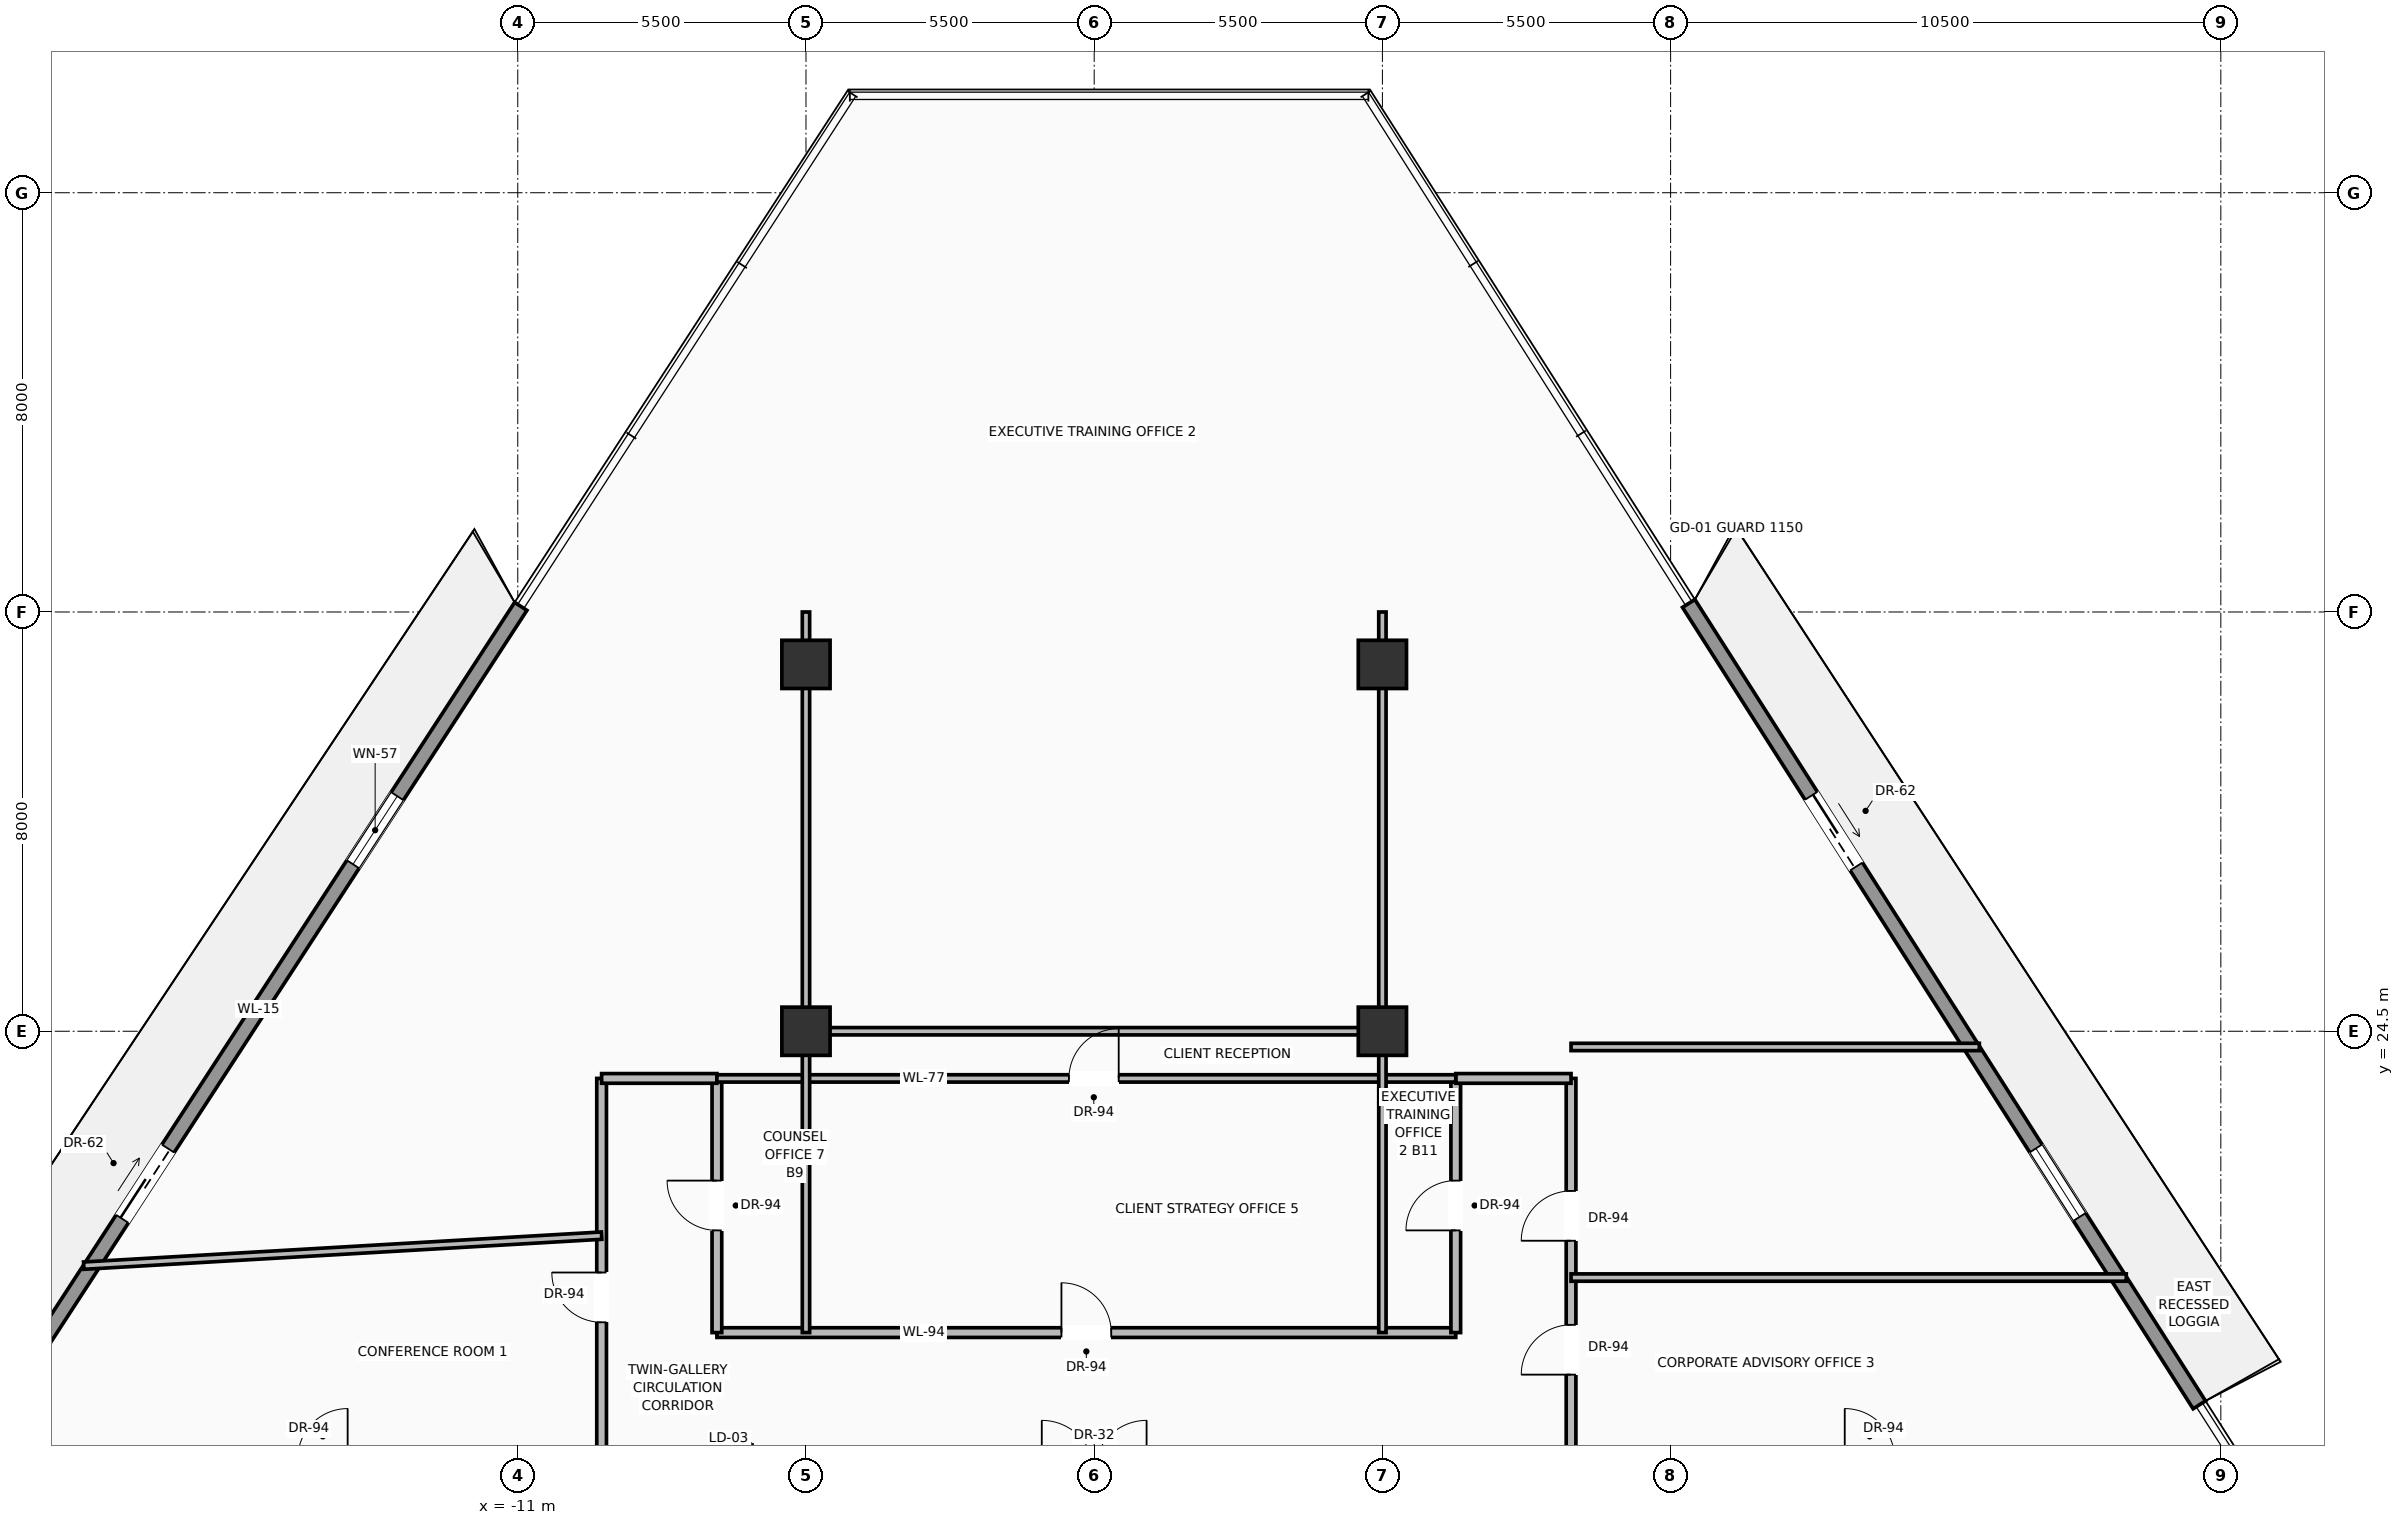
"""IFC4 building model, lengths in metres.
Left out: names, types, materials, properties, quantities, classifications, styles, units other than length and angle.
Written with IfcOpenShell. Run it as: python <this file> out.ifc"""

import sys

from ifc_helpers import new_model, si_unit, direction, frame, frame_2d, origin, origin_2d, place, context, subcontext, project, spatial, rectangle, extrude, source, transform, mapped, element, fill, save


model = new_model("IFC4")
c1 = context("Model", 3, precision=1e-05, world=origin(), true_north=direction((0.0, 1.0)))
c2 = subcontext(c1, "Body", "Model", "MODEL_VIEW")
j1 = project(units=[si_unit("LENGTHUNIT", "METRE"), si_unit("PLANEANGLEUNIT", "RADIAN")], contexts=[c1])
p1 = place(None, origin())
s1 = spatial("IfcSite", under=j1, at=p1, CompositionType="ELEMENT")
p2 = place(p1, origin())
s2 = spatial("IfcBuilding", under=s1, at=p2, CompositionType="ELEMENT")
p3 = place(p2, frame((0.0, 0.0, 140.4)))
s3 = spatial("IfcBuildingStorey", under=s2, at=p3, CompositionType="ELEMENT", Elevation=140.4)
m1 = source(origin(), c2, "Body", "SweptSolid", [
    extrude(rectangle(XDim=0.92, YDim=0.92, at=origin_2d()), origin(), (0.0, 0.0, 1.0), 3.7),
])
for number, where, z_axis, x_axis in (
    (1, (-5.5, 24.5, 0.0), (0.0, 0.0, 1.0), (1.0, 0.0, 0.0)),
    (2, (5.5, 24.5, 0.0), (0.0, 0.0, 1.0), (1.0, 0.0, 0.0)),
    (3, (-5.5, 31.5, 0.0), (0.0, 0.0, 1.0), (1.0, 0.0, 0.0)),
    (4, (5.5, 31.5, 0.0), (0.0, 0.0, 1.0), (1.0, 0.0, 0.0)),
):
    element("IfcColumn", number, at=place(p3, frame(where, z_axis=z_axis, x_axis=x_axis)), inside=s3, PredefinedType="COLUMN", context=c2, shape_type="MappedRepresentation", body=[
        mapped(m1, transform((0.0, 0.0, 0.0), scale=1.0)),
    ])
p4 = place(p3, frame((-20.948, 17.229, 0.0), z_axis=(0.0, 0.0, 1.0), x_axis=(0.545376053717, 0.838191481723, 0.0)))
e5 = element("IfcWall", 5, at=p4, inside=s3, PredefinedType="SOLIDWALL", context=c2, shape_type="SweptSolid", body=[
    extrude(rectangle(XDim=18.346, YDim=0.28, at=frame_2d((9.173, 0.0))), origin(), (0.0, 0.0, 1.0), 3.05),
])
p5 = place(p4, frame((4.403, 0.0, 0.0)))
e6 = element("IfcOpeningElement", 6, at=p5, cuts=e5, PredefinedType="OPENING", context=c2, shape_type="SweptSolid", body=[
    extrude(rectangle(XDim=1.6, YDim=2.35, at=frame_2d((0.8, 1.175))), frame((0.0, 0.15, 0.0), z_axis=(0.0, -1.0, 0.0), x_axis=(1.0, 0.0, 0.0)), (0.0, 0.0, 1.0), 0.3),
])
p6 = place(p4, frame((12.475, 0.0, 0.9)))
e7 = element("IfcOpeningElement", 7, at=p6, cuts=e5, PredefinedType="OPENING", context=c2, shape_type="SweptSolid", body=[
    extrude(rectangle(XDim=1.55, YDim=1.85, at=frame_2d((0.775, 0.925))), frame((0.0, 0.15, 0.0), z_axis=(0.0, -1.0, 0.0), x_axis=(1.0, 0.0, 0.0)), (0.0, 0.0, 1.0), 0.3),
])
p7 = place(p3, frame((11.345, 32.663, 0.0), z_axis=(0.0, 0.0, 1.0), x_axis=(0.537390272984, -0.843333679217, 0.0)))
e8 = element("IfcWall", 8, at=p7, inside=s3, PredefinedType="SOLIDWALL", context=c2, shape_type="SweptSolid", body=[
    extrude(rectangle(XDim=18.133, YDim=0.28, at=frame_2d((9.066, 0.0))), origin(), (0.0, 0.0, 1.0), 3.05),
])
p8 = place(p7, frame((4.352, 0.0, 0.0)))
e9 = element("IfcOpeningElement", 9, at=p8, cuts=e8, PredefinedType="OPENING", context=c2, shape_type="SweptSolid", body=[
    extrude(rectangle(XDim=1.6, YDim=2.35, at=frame_2d((0.8, 1.175))), frame((0.0, 0.15, 0.0), z_axis=(0.0, -1.0, 0.0), x_axis=(1.0, 0.0, 0.0)), (0.0, 0.0, 1.0), 0.3),
])
p9 = place(p7, frame((12.33, 0.0, 0.9)))
e10 = element("IfcOpeningElement", 10, at=p9, cuts=e8, PredefinedType="OPENING", context=c2, shape_type="SweptSolid", body=[
    extrude(rectangle(XDim=1.55, YDim=1.85, at=frame_2d((0.775, 0.925))), frame((0.0, 0.15, 0.0), z_axis=(0.0, -1.0, 0.0), x_axis=(1.0, 0.0, 0.0)), (0.0, 0.0, 1.0), 0.3),
])
p10 = place(p3, frame((-7.2, 18.75, 0.0), z_axis=(0.0, 0.0, 1.0), x_axis=(1.0, 0.0, 0.0)))
e11 = element("IfcWall", 11, at=p10, inside=s3, PredefinedType="PARTITIONING", context=c2, shape_type="SweptSolid", body=[
    extrude(rectangle(XDim=14.1, YDim=0.185, at=frame_2d((7.05, 0.0))), origin(), (0.0, 0.0, 1.0), 2.846),
])
p11 = place(p10, frame((6.575, 0.0, 0.0)))
e12 = element("IfcOpeningElement", 12, at=p11, cuts=e11, PredefinedType="OPENING", context=c2, shape_type="SweptSolid", body=[
    extrude(rectangle(XDim=0.95, YDim=2.2, at=frame_2d((0.475, 1.1))), frame((0.0, 0.103, 0.0), z_axis=(0.0, -1.0, 0.0), x_axis=(1.0, 0.0, 0.0)), (0.0, 0.0, 1.0), 0.205),
])
p12 = place(p3, frame((-7.2, 18.75, 0.0), z_axis=(0.0, 0.0, 1.0), x_axis=(0.0, 1.0, 0.0)))
e13 = element("IfcWall", 13, at=p12, inside=s3, PredefinedType="PARTITIONING", context=c2, shape_type="SweptSolid", body=[
    extrude(rectangle(XDim=4.85, YDim=0.185, at=frame_2d((2.425, 0.0))), origin(), (0.0, 0.0, 1.0), 3.462),
])
p13 = place(p12, frame((1.95, 0.0, 0.0)))
e14 = element("IfcOpeningElement", 14, at=p13, cuts=e13, PredefinedType="OPENING", context=c2, shape_type="SweptSolid", body=[
    extrude(rectangle(XDim=0.95, YDim=2.2, at=frame_2d((0.475, 1.1))), frame((0.0, 0.103, 0.0), z_axis=(0.0, -1.0, 0.0), x_axis=(1.0, 0.0, 0.0)), (0.0, 0.0, 1.0), 0.205),
])
p14 = place(p3, frame((6.9, 18.75, 0.0), z_axis=(0.0, 0.0, 1.0), x_axis=(0.0, 1.0, 0.0)))
e15 = element("IfcWall", 15, at=p14, inside=s3, PredefinedType="PARTITIONING", context=c2, shape_type="SweptSolid", body=[
    extrude(rectangle(XDim=4.85, YDim=0.185, at=frame_2d((2.425, 0.0))), origin(), (0.0, 0.0, 1.0), 3.462),
])
p15 = place(p14, frame((1.95, 0.0, 0.0)))
e16 = element("IfcOpeningElement", 16, at=p15, cuts=e15, PredefinedType="OPENING", context=c2, shape_type="SweptSolid", body=[
    extrude(rectangle(XDim=0.95, YDim=2.2, at=frame_2d((0.475, 1.1))), frame((0.0, 0.103, 0.0), z_axis=(0.0, -1.0, 0.0), x_axis=(1.0, 0.0, 0.0)), (0.0, 0.0, 1.0), 0.205),
])
p16 = place(p3, frame((-9.4, 16.4, 0.0), z_axis=(0.0, 0.0, 1.0), x_axis=(0.0, 1.0, 0.0)))
e17 = element("IfcWall", 17, at=p16, inside=s3, PredefinedType="PARTITIONING", context=c2, shape_type="SweptSolid", body=[
    extrude(rectangle(XDim=7.2, YDim=0.185, at=frame_2d((3.6, 0.0))), origin(), (0.0, 0.0, 1.0), 3.462),
])
p17 = place(p16, frame((2.546, 0.0, 0.0)))
e18 = element("IfcOpeningElement", 18, at=p17, cuts=e17, PredefinedType="OPENING", context=c2, shape_type="SweptSolid", body=[
    extrude(rectangle(XDim=0.95, YDim=2.2, at=frame_2d((0.475, 1.1))), frame((0.0, 0.103, 0.0), z_axis=(0.0, -1.0, 0.0), x_axis=(1.0, 0.0, 0.0)), (0.0, 0.0, 1.0), 0.205),
])
p18 = place(p3, frame((9.1, 16.4, 0.0), z_axis=(0.0, 0.0, 1.0), x_axis=(0.0, 1.0, 0.0)))
e19 = element("IfcWall", 19, at=p18, inside=s3, PredefinedType="PARTITIONING", context=c2, shape_type="SweptSolid", body=[
    extrude(rectangle(XDim=7.2, YDim=0.185, at=frame_2d((3.6, 0.0))), origin(), (0.0, 0.0, 1.0), 3.462),
])
p19 = place(p18, frame((4.103, 0.0, 0.0)))
e20 = element("IfcOpeningElement", 20, at=p19, cuts=e19, PredefinedType="OPENING", context=c2, shape_type="SweptSolid", body=[
    extrude(rectangle(XDim=0.95, YDim=2.2, at=frame_2d((0.475, 1.1))), frame((0.0, 0.103, 0.0), z_axis=(0.0, -1.0, 0.0), x_axis=(1.0, 0.0, 0.0)), (0.0, 0.0, 1.0), 0.205),
])
p20 = place(p18, frame((1.548, 0.0, 0.0)))
e21 = element("IfcOpeningElement", 21, at=p20, cuts=e19, PredefinedType="OPENING", context=c2, shape_type="SweptSolid", body=[
    extrude(rectangle(XDim=0.95, YDim=2.2, at=frame_2d((0.475, 1.1))), frame((0.0, 0.103, 0.0), z_axis=(0.0, -1.0, 0.0), x_axis=(1.0, 0.0, 0.0)), (0.0, 0.0, 1.0), 0.205),
])
p21 = place(p3, frame((-9.4, 23.6, 0.0), z_axis=(0.0, 0.0, 1.0), x_axis=(1.0, 0.0, 0.0)))
e22 = element("IfcWall", 22, at=p21, inside=s3, PredefinedType="PARTITIONING", context=c2, shape_type="SweptSolid", body=[
    extrude(rectangle(XDim=2.2, YDim=0.185, at=frame_2d((1.1, 0.0))), origin(), (0.0, 0.0, 1.0), 3.462),
])
p22 = place(p3, frame((6.9, 23.6, 0.0), z_axis=(0.0, 0.0, 1.0), x_axis=(1.0, 0.0, 0.0)))
e23 = element("IfcWall", 23, at=p22, inside=s3, PredefinedType="PARTITIONING", context=c2, shape_type="SweptSolid", body=[
    extrude(rectangle(XDim=2.2, YDim=0.185, at=frame_2d((1.1, 0.0))), origin(), (0.0, 0.0, 1.0), 3.462),
])
p23 = place(p3, frame((-7.2, 23.6, 0.0), z_axis=(0.0, 0.0, 1.0), x_axis=(1.0, 0.0, 0.0)))
e24 = element("IfcWall", 24, at=p23, inside=s3, PredefinedType="PARTITIONING", context=c2, shape_type="SweptSolid", body=[
    extrude(rectangle(XDim=14.1, YDim=0.14, at=frame_2d((7.05, 0.0))), origin(), (0.0, 0.0, 1.0), 3.462),
])
p24 = place(p23, frame((6.718, 0.0, 0.0)))
e25 = element("IfcOpeningElement", 25, at=p24, cuts=e24, PredefinedType="OPENING", context=c2, shape_type="SweptSolid", body=[
    extrude(rectangle(XDim=0.95, YDim=2.2, at=frame_2d((0.475, 1.1))), frame((0.0, 0.08, 0.0), z_axis=(0.0, -1.0, 0.0), x_axis=(1.0, 0.0, 0.0)), (0.0, 0.0, 1.0), 0.16),
])
for number, where, z_axis, x_axis in (
    (26, (-5.5, 18.75, 0.0), (0.0, 0.0, 1.0), (0.0, 1.0, 0.0)),
    (27, (5.5, 18.75, 0.0), (0.0, 0.0, 1.0), (0.0, 1.0, 0.0)),
):
    element("IfcWall", number, at=place(p3, frame(where, z_axis=z_axis, x_axis=x_axis)), inside=s3, PredefinedType="PARTITIONING", context=c2, shape_type="SweptSolid", body=[
        extrude(rectangle(XDim=13.75, YDim=0.14, at=frame_2d((6.875, 0.0))), origin(), (0.0, 0.0, 1.0), 2.846),
    ])
p25 = place(p3, frame((-5.5, 24.5, 0.0), z_axis=(0.0, 0.0, 1.0), x_axis=(1.0, 0.0, 0.0)))
e28 = element("IfcWall", 28, at=p25, inside=s3, PredefinedType="PARTITIONING", context=c2, shape_type="SweptSolid", body=[
    extrude(rectangle(XDim=11.0, YDim=0.14, at=frame_2d((5.5, 0.0))), origin(), (0.0, 0.0, 1.0), 2.846),
])
p26 = place(p3, frame((-19.283, 20.027, 0.0), z_axis=(0.0, 0.0, 1.0), x_axis=(0.998323429122, 0.057882042691, 0.0)))
e29 = element("IfcWall", 29, at=p26, inside=s3, PredefinedType="PARTITIONING", context=c2, shape_type="SweptSolid", body=[
    extrude(rectangle(XDim=9.899, YDim=0.14, at=frame_2d((4.95, 0.0))), origin(), (0.0, 0.0, 1.0), 3.462),
])
p27 = place(p3, frame((9.1, 19.8, 0.0), z_axis=(0.0, 0.0, 1.0), x_axis=(1.0, 0.0, 0.0)))
e30 = element("IfcWall", 30, at=p27, inside=s3, PredefinedType="PARTITIONING", context=c2, shape_type="SweptSolid", body=[
    extrude(rectangle(XDim=10.596, YDim=0.14, at=frame_2d((5.298, 0.0))), origin(), (0.0, 0.0, 1.0), 3.462),
])
p28 = place(p3, frame((9.1, 24.2, 0.0), z_axis=(0.0, 0.0, 1.0), x_axis=(1.0, 0.0, 0.0)))
e31 = element("IfcWall", 31, at=p28, inside=s3, PredefinedType="PARTITIONING", context=c2, shape_type="SweptSolid", body=[
    extrude(rectangle(XDim=7.792, YDim=0.14, at=frame_2d((3.896, 0.0))), origin(), (0.0, 0.0, 1.0), 3.462),
])
m2 = source(origin(), c2, "Body", "SweptSolid", [
    extrude(rectangle(XDim=1.6, YDim=2.35, at=frame_2d((0.8, 1.175))), frame((0.0, 0.025, 0.0), z_axis=(0.0, -1.0, 0.0), x_axis=(1.0, 0.0, 0.0)), (0.0, 0.0, 1.0), 0.05),
])
p29 = place(p5, origin())
e32 = element("IfcDoor", 32, at=p29, inside=s3, OperationType="SLIDING_TO_LEFT", PredefinedType="DOOR", context=c2, shape_type="MappedRepresentation", body=[
    mapped(m2, transform((0.0, 0.0, 0.0), scale=1.0)),
])
fill(e6, e32)
m3 = source(origin(), c2, "Body", "SweptSolid", [
    extrude(rectangle(XDim=1.55, YDim=1.85, at=frame_2d((0.775, 0.925))), frame((0.0, 0.03, 0.0), z_axis=(0.0, -1.0, 0.0), x_axis=(1.0, 0.0, 0.0)), (0.0, 0.0, 1.0), 0.06),
])
p30 = place(p6, origin())
e33 = element("IfcWindow", 33, at=p30, inside=s3, PartitioningType="SINGLE_PANEL", PredefinedType="WINDOW", context=c2, shape_type="MappedRepresentation", body=[
    mapped(m3, transform((0.0, 0.0, 0.0), scale=1.0)),
])
fill(e7, e33)
p31 = place(p8, origin())
e34 = element("IfcDoor", 34, at=p31, inside=s3, OperationType="SLIDING_TO_RIGHT", PredefinedType="DOOR", context=c2, shape_type="MappedRepresentation", body=[
    mapped(m2, transform((0.0, 0.0, 0.0), scale=1.0)),
])
fill(e9, e34)
p32 = place(p9, origin())
e35 = element("IfcWindow", 35, at=p32, inside=s3, PartitioningType="SINGLE_PANEL", PredefinedType="WINDOW", context=c2, shape_type="MappedRepresentation", body=[
    mapped(m3, transform((0.0, 0.0, 0.0), scale=1.0)),
])
fill(e10, e35)
m4 = source(origin(), c2, "Body", "SweptSolid", [
    extrude(rectangle(XDim=0.95, YDim=2.2, at=frame_2d((0.475, 1.1))), frame((0.0, 0.025, 0.0), z_axis=(0.0, -1.0, 0.0), x_axis=(1.0, 0.0, 0.0)), (0.0, 0.0, 1.0), 0.05),
])
p33 = place(p11, origin())
e36 = element("IfcDoor", 36, at=p33, inside=s3, OperationType="SINGLE_SWING_LEFT", PredefinedType="DOOR", context=c2, shape_type="MappedRepresentation", body=[
    mapped(m4, transform((0.0, 0.0, 0.0), scale=1.0)),
])
fill(e12, e36)
p34 = place(p17, origin())
e37 = element("IfcDoor", 37, at=p34, inside=s3, OperationType="SINGLE_SWING_RIGHT", PredefinedType="DOOR", context=c2, shape_type="MappedRepresentation", body=[
    mapped(m4, transform((0.0, 0.0, 0.0), scale=1.0)),
])
fill(e18, e37)
p35 = place(p19, origin())
e38 = element("IfcDoor", 38, at=p35, inside=s3, OperationType="SINGLE_SWING_LEFT", PredefinedType="DOOR", context=c2, shape_type="MappedRepresentation", body=[
    mapped(m4, transform((0.0, 0.0, 0.0), scale=1.0)),
])
fill(e20, e38)
p36 = place(p20, origin())
e39 = element("IfcDoor", 39, at=p36, inside=s3, OperationType="SINGLE_SWING_LEFT", PredefinedType="DOOR", context=c2, shape_type="MappedRepresentation", body=[
    mapped(m4, transform((0.0, 0.0, 0.0), scale=1.0)),
])
fill(e21, e39)
p37 = place(p13, origin())
e40 = element("IfcDoor", 40, at=p37, inside=s3, OperationType="SINGLE_SWING_RIGHT", PredefinedType="DOOR", context=c2, shape_type="MappedRepresentation", body=[
    mapped(m4, transform((0.0, 0.0, 0.0), scale=1.0)),
])
fill(e14, e40)
p38 = place(p15, origin())
e41 = element("IfcDoor", 41, at=p38, inside=s3, OperationType="SINGLE_SWING_LEFT", PredefinedType="DOOR", context=c2, shape_type="MappedRepresentation", body=[
    mapped(m4, transform((0.0, 0.0, 0.0), scale=1.0)),
])
fill(e16, e41)
p39 = place(p24, origin())
e42 = element("IfcDoor", 42, at=p39, inside=s3, OperationType="SINGLE_SWING_RIGHT", PredefinedType="DOOR", context=c2, shape_type="MappedRepresentation", body=[
    mapped(m4, transform((0.0, 0.0, 0.0), scale=1.0)),
])
fill(e25, e42)
save(model, sys.argv[1])
